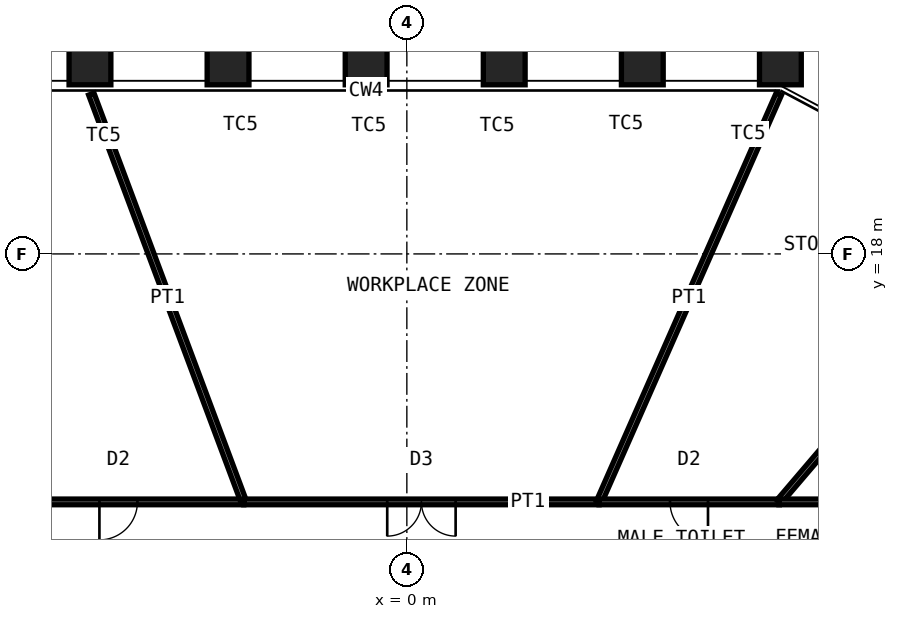
"""IFC4 building model, lengths in metres.
Left out: names, types, materials, properties, quantities, classifications, styles, units other than length and angle.
Written with IfcOpenShell. Run it as: python <this file> out.ifc"""

import sys

from ifc_helpers import new_model, si_unit, direction, frame, frame_2d, origin, origin_2d, place, context, subcontext, project, spatial, rectangle, hollow_rectangle, extrude, element, fill, save


model = new_model("IFC4")
c1 = context("Model", 3, precision=1e-05, world=origin(), true_north=direction((0.0, 1.0)))
c2 = subcontext(c1, "Body", "Model", "MODEL_VIEW")
j1 = project(units=[si_unit("LENGTHUNIT", "METRE"), si_unit("PLANEANGLEUNIT", "RADIAN")], contexts=[c1])
p1 = place(None, origin())
s1 = spatial("IfcSite", under=j1, at=p1, CompositionType="ELEMENT")
p2 = place(p1, origin())
s2 = spatial("IfcBuilding", under=s1, at=p2, CompositionType="ELEMENT")
p3 = place(p2, frame((0.0, 0.0, 188.8)))
s3 = spatial("IfcBuildingStorey", under=s2, at=p3, CompositionType="ELEMENT", Elevation=188.8)
for number, where, z_axis, x_axis in (
    (1, (-8.338, 23.0, 0.0), (0.0, 0.0, 1.0), (-1.0, 0.0, 0.0)),
    (2, (-4.705, 23.0, 0.0), (0.0, 0.0, 1.0), (-1.0, 0.0, 0.0)),
    (3, (-1.071, 23.0, 0.0), (0.0, 0.0, 1.0), (-1.0, 0.0, 0.0)),
    (4, (2.562, 23.0, 0.0), (0.0, 0.0, 1.0), (-1.0, 0.0, 0.0)),
    (5, (6.196, 23.0, 0.0), (0.0, 0.0, 1.0), (-1.0, 0.0, 0.0)),
    (6, (9.829, 23.0, 0.0), (0.0, 0.0, 1.0), (-1.0, 0.0, 0.0)),
):
    element("IfcColumn", number, at=place(p3, frame(where, z_axis=z_axis, x_axis=x_axis)), inside=s3, PredefinedType="COLUMN", context=c2, shape_type="SweptSolid", body=[
        extrude(hollow_rectangle(XDim=1.1, YDim=1.1, WallThickness=0.07, at=origin_2d()), origin(), (0.0, 0.0, 1.0), 4.2),
    ])
p4 = place(p3, frame((-10.889, 11.475, 0.0), z_axis=(0.0, 0.0, 1.0), x_axis=(1.0, 0.0, 0.0)))
e7 = element("IfcWall", 7, at=p4, inside=s3, PredefinedType="PARTITIONING", context=c2, shape_type="SweptSolid", body=[
    extrude(rectangle(XDim=6.598, YDim=0.15, at=frame_2d((3.299, 0.0))), origin(), (0.0, 0.0, 1.0), 4.03),
])
p5 = place(p4, frame((2.799, 0.0, 0.0)))
e8 = element("IfcOpeningElement", 8, at=p5, cuts=e7, PredefinedType="OPENING", context=c2, shape_type="SweptSolid", body=[
    extrude(rectangle(XDim=1.0, YDim=2.4, at=frame_2d((0.5, 1.2))), frame((0.0, 0.085, 0.0), z_axis=(0.0, -1.0, 0.0), x_axis=(1.0, 0.0, 0.0)), (0.0, 0.0, 1.0), 0.17),
])
p6 = place(p3, frame((-8.303, 22.206, 0.0), z_axis=(0.0, 0.0, 1.0), x_axis=(0.350242883069, -0.936658914899, 0.0)))
e9 = element("IfcWall", 9, at=p6, inside=s3, PredefinedType="PARTITIONING", context=c2, shape_type="SweptSolid", body=[
    extrude(rectangle(XDim=11.457, YDim=0.15, at=frame_2d((5.729, 0.0))), origin(), (0.0, 0.0, 1.0), 3.43),
])
p7 = place(p3, frame((-4.291, 11.475, 0.0), z_axis=(0.0, 0.0, 1.0), x_axis=(1.0, 0.0, 0.0)))
e10 = element("IfcWall", 10, at=p7, inside=s3, PredefinedType="PARTITIONING", context=c2, shape_type="SweptSolid", body=[
    extrude(rectangle(XDim=9.349, YDim=0.15, at=frame_2d((4.674, 0.0))), origin(), (0.0, 0.0, 1.0), 4.03),
])
p8 = place(p7, frame((3.774, 0.0, 0.0)))
e11 = element("IfcOpeningElement", 11, at=p8, cuts=e10, PredefinedType="OPENING", context=c2, shape_type="SweptSolid", body=[
    extrude(rectangle(XDim=1.8, YDim=2.4, at=frame_2d((0.9, 1.2))), frame((0.0, 0.085, 0.0), z_axis=(0.0, -1.0, 0.0), x_axis=(1.0, 0.0, 0.0)), (0.0, 0.0, 1.0), 0.17),
])
p9 = place(p3, frame((9.789, 22.208, 0.0), z_axis=(0.0, 0.0, 1.0), x_axis=(-0.403346052835, -0.9150475188, 0.0)))
e12 = element("IfcWall", 12, at=p9, inside=s3, PredefinedType="PARTITIONING", context=c2, shape_type="SweptSolid", body=[
    extrude(rectangle(XDim=11.73, YDim=0.15, at=frame_2d((5.865, 0.0))), origin(), (0.0, 0.0, 1.0), 2.93),
])
p10 = place(p3, frame((5.058, 11.475, 0.0), z_axis=(0.0, 0.0, 1.0), x_axis=(1.0, 0.0, 0.0)))
e13 = element("IfcWall", 13, at=p10, inside=s3, PredefinedType="PARTITIONING", context=c2, shape_type="SweptSolid", body=[
    extrude(rectangle(XDim=4.733, YDim=0.15, at=frame_2d((2.367, 0.0))), origin(), (0.0, 0.0, 1.0), 4.03),
])
p11 = place(p10, frame((1.867, 0.0, 0.0)))
e14 = element("IfcOpeningElement", 14, at=p11, cuts=e13, PredefinedType="OPENING", context=c2, shape_type="SweptSolid", body=[
    extrude(rectangle(XDim=1.0, YDim=2.4, at=frame_2d((0.5, 1.2))), frame((0.0, 0.085, 0.0), z_axis=(0.0, -1.0, 0.0), x_axis=(1.0, 0.0, 0.0)), (0.0, 0.0, 1.0), 0.17),
])
p12 = place(p3, frame((14.958, 17.531, 0.0), z_axis=(0.0, 0.0, 1.0), x_axis=(-0.649097500837, -0.760705221756, 0.0)))
e15 = element("IfcWall", 15, at=p12, inside=s3, PredefinedType="PARTITIONING", context=c2, shape_type="SweptSolid", body=[
    extrude(rectangle(XDim=7.96, YDim=0.15, at=frame_2d((3.98, 0.0))), origin(), (0.0, 0.0, 1.0), 3.43),
])
p13 = place(p3, frame((9.791, 11.475, 0.0), z_axis=(0.0, 0.0, 1.0), x_axis=(1.0, 0.0, 0.0)))
e16 = element("IfcWall", 16, at=p13, inside=s3, PredefinedType="PARTITIONING", context=c2, shape_type="SweptSolid", body=[
    extrude(rectangle(XDim=4.684, YDim=0.15, at=frame_2d((2.342, 0.0))), origin(), (0.0, 0.0, 1.0), 4.03),
])
p14 = place(p5, origin())
e17 = element("IfcDoor", 17, at=p14, inside=s3, OperationType="SINGLE_SWING_LEFT", PredefinedType="DOOR", context=c2, shape_type="SweptSolid", body=[
    extrude(rectangle(XDim=1.0, YDim=2.4, at=frame_2d((0.5, 1.2))), frame((0.0, 0.025, 0.0), z_axis=(0.0, -1.0, 0.0), x_axis=(1.0, 0.0, 0.0)), (0.0, 0.0, 1.0), 0.05),
])
fill(e8, e17)
p15 = place(p8, origin())
e18 = element("IfcDoor", 18, at=p15, inside=s3, OperationType="DOUBLE_DOOR_DOUBLE_SWING", PredefinedType="DOOR", context=c2, shape_type="SweptSolid", body=[
    extrude(rectangle(XDim=1.8, YDim=2.4, at=frame_2d((0.9, 1.2))), frame((0.0, 0.025, 0.0), z_axis=(0.0, -1.0, 0.0), x_axis=(1.0, 0.0, 0.0)), (0.0, 0.0, 1.0), 0.05),
])
fill(e11, e18)
p16 = place(p11, origin())
e19 = element("IfcDoor", 19, at=p16, inside=s3, OperationType="SINGLE_SWING_RIGHT", PredefinedType="DOOR", context=c2, shape_type="SweptSolid", body=[
    extrude(rectangle(XDim=1.0, YDim=2.4, at=frame_2d((0.5, 1.2))), frame((0.0, 0.025, 0.0), z_axis=(0.0, -1.0, 0.0), x_axis=(1.0, 0.0, 0.0)), (0.0, 0.0, 1.0), 0.05),
])
fill(e14, e19)
save(model, sys.argv[1])
